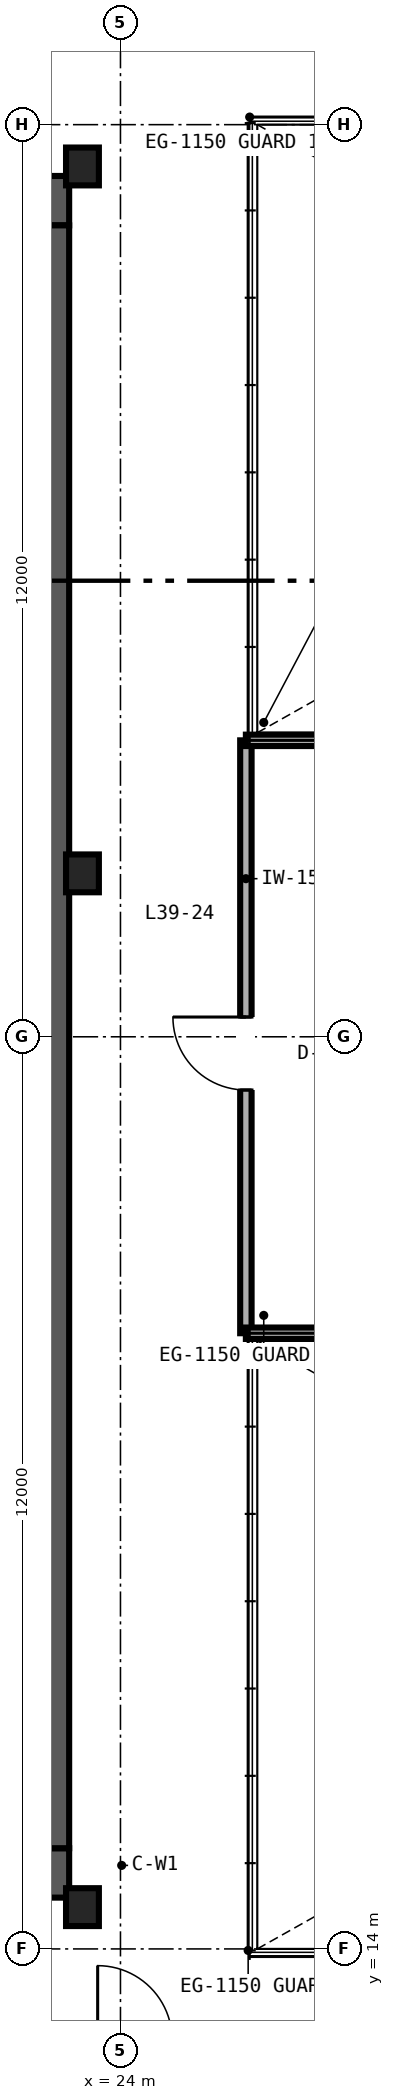
"""IFC4 building model, lengths in metres.
Left out: names, types, materials, properties, quantities, classifications, styles, units other than length and angle.
Written with IfcOpenShell. Run it as: python <this file> out.ifc"""

import sys

from ifc_helpers import new_model, si_unit, direction, frame, frame_2d, origin, origin_2d, place, context, subcontext, project, spatial, rectangle, i_section, extrude, source, transform, mapped, element, fill, save


model = new_model("IFC4")
c1 = context("Model", 3, precision=1e-05, world=origin(), true_north=direction((0.0, 1.0)))
c2 = subcontext(c1, "Body", "Model", "MODEL_VIEW")
j1 = project(units=[si_unit("LENGTHUNIT", "METRE"), si_unit("PLANEANGLEUNIT", "RADIAN")], contexts=[c1])
p1 = place(None, origin())
s1 = spatial("IfcSite", under=j1, at=p1, CompositionType="ELEMENT")
p2 = place(p1, origin())
s2 = spatial("IfcBuilding", under=s1, at=p2, CompositionType="ELEMENT")
p3 = place(p2, frame((0.0, 0.0, 158.4)))
s3 = spatial("IfcBuildingStorey", under=s2, at=p3, CompositionType="ELEMENT", Elevation=158.4)
p4 = place(p3, frame((10.675, 15.0, 0.0), z_axis=(0.0, 0.0, 1.0), x_axis=(1.0, 0.0, 0.0)))
e1 = element("IfcWall", 1, at=p4, inside=s3, PredefinedType="SHEAR", context=c2, shape_type="SweptSolid", body=[
    extrude(rectangle(XDim=12.65, YDim=0.65, at=frame_2d((6.325, 0.0))), origin(), (0.0, 0.0, 1.0), 4.57),
])
p5 = place(p4, frame((10.225, 0.0, 0.0)))
e2 = element("IfcOpeningElement", 2, at=p5, cuts=e1, PredefinedType="OPENING", context=c2, shape_type="SweptSolid", body=[
    extrude(rectangle(XDim=1.0, YDim=2.15, at=frame_2d((0.5, 1.075))), frame((0.0, 0.335, 0.0), z_axis=(0.0, -1.0, 0.0), x_axis=(1.0, 0.0, 0.0)), (0.0, 0.0, 1.0), 0.67),
])
p6 = place(p3, frame((10.675, 37.0, 0.0), z_axis=(0.0, 0.0, 1.0), x_axis=(1.0, 0.0, 0.0)))
e3 = element("IfcWall", 3, at=p6, inside=s3, PredefinedType="SHEAR", context=c2, shape_type="SweptSolid", body=[
    extrude(rectangle(XDim=12.65, YDim=0.65, at=frame_2d((6.325, 0.0))), origin(), (0.0, 0.0, 1.0), 4.57),
])
p7 = place(p6, frame((8.905, 0.0, 0.0)))
e4 = element("IfcOpeningElement", 4, at=p7, cuts=e3, PredefinedType="OPENING", context=c2, shape_type="SweptSolid", body=[
    extrude(rectangle(XDim=1.0, YDim=2.15, at=frame_2d((0.5, 1.075))), frame((0.0, 0.335, 0.0), z_axis=(0.0, -1.0, 0.0), x_axis=(1.0, 0.0, 0.0)), (0.0, 0.0, 1.0), 0.67),
])
p8 = place(p3, frame((23.0, 15.325, 0.0), z_axis=(0.0, 0.0, 1.0), x_axis=(0.0, 1.0, 0.0)))
e5 = element("IfcWall", 5, at=p8, inside=s3, PredefinedType="SHEAR", context=c2, shape_type="SweptSolid", body=[
    extrude(rectangle(XDim=21.35, YDim=0.65, at=frame_2d((10.675, 0.0))), origin(), (0.0, 0.0, 1.0), 4.57),
])
m1 = source(origin(), c2, "Body", "SweptSolid", [
    extrude(i_section(OverallWidth=0.432, OverallDepth=0.498, WebThickness=0.056, FlangeThickness=0.089, FilletRadius=0.025, at=origin_2d()), origin(), (0.0, 0.0, 1.0), 4.57),
])
for number, where, z_axis, x_axis in (
    (6, (23.5, 14.55, 0.0), (0.0, 0.0, 1.0), (1.0, 0.0, 0.0)),
    (7, (23.5, 28.15, 0.0), (0.0, 0.0, 1.0), (1.0, 0.0, 0.0)),
    (8, (23.5, 37.45, 0.0), (0.0, 0.0, 1.0), (1.0, 0.0, 0.0)),
):
    element("IfcColumn", number, at=place(p3, frame(where, z_axis=z_axis, x_axis=x_axis)), inside=s3, PredefinedType="COLUMN", context=c2, shape_type="MappedRepresentation", body=[
        mapped(m1, transform((0.0, 0.0, 0.0), scale=1.0)),
    ])
p9 = place(p3, frame((25.65, 22.1, 0.0), z_axis=(0.0, 0.0, 1.0), x_axis=(0.0, 1.0, 0.0)))
e9 = element("IfcWall", 9, at=p9, inside=s3, PredefinedType="PARTITIONING", context=c2, shape_type="SweptSolid", body=[
    extrude(rectangle(XDim=7.8, YDim=0.15, at=frame_2d((3.9, 0.0))), origin(), (0.0, 0.0, 1.0), 3.643),
])
p10 = place(p9, frame((3.2, 0.0, 0.0)))
e10 = element("IfcOpeningElement", 10, at=p10, cuts=e9, PredefinedType="OPENING", context=c2, shape_type="SweptSolid", body=[
    extrude(rectangle(XDim=0.96, YDim=2.15, at=frame_2d((0.48, 1.075))), frame((0.0, 0.085, 0.0), z_axis=(0.0, -1.0, 0.0), x_axis=(1.0, 0.0, 0.0)), (0.0, 0.0, 1.0), 0.17),
])
for number, where, z_axis, x_axis in (
    (11, (25.65, 22.1, 0.0), (0.0, 0.0, 1.0), (1.0, 0.0, 0.0)),
    (12, (25.65, 29.9, 0.0), (0.0, 0.0, 1.0), (1.0, 0.0, 0.0)),
):
    element("IfcWall", number, at=place(p3, frame(where, z_axis=z_axis, x_axis=x_axis)), inside=s3, PredefinedType="PARTITIONING", context=c2, shape_type="SweptSolid", body=[
        extrude(rectangle(XDim=14.3, YDim=0.15, at=frame_2d((7.15, 0.0))), origin(), (0.0, 0.0, 1.0), 4.57),
    ])
m2 = source(origin(), c2, "Body", "SweptSolid", [
    extrude(rectangle(XDim=0.96, YDim=2.15, at=frame_2d((0.48, 1.075))), frame((0.0, 0.025, 0.0), z_axis=(0.0, -1.0, 0.0), x_axis=(1.0, 0.0, 0.0)), (0.0, 0.0, 1.0), 0.05),
])
p11 = place(p10, origin())
e13 = element("IfcDoor", 13, at=p11, inside=s3, OperationType="SINGLE_SWING_RIGHT", PredefinedType="DOOR", context=c2, shape_type="MappedRepresentation", body=[
    mapped(m2, transform((0.0, 0.0, 0.0), scale=1.0)),
])
fill(e10, e13)
save(model, sys.argv[1])
